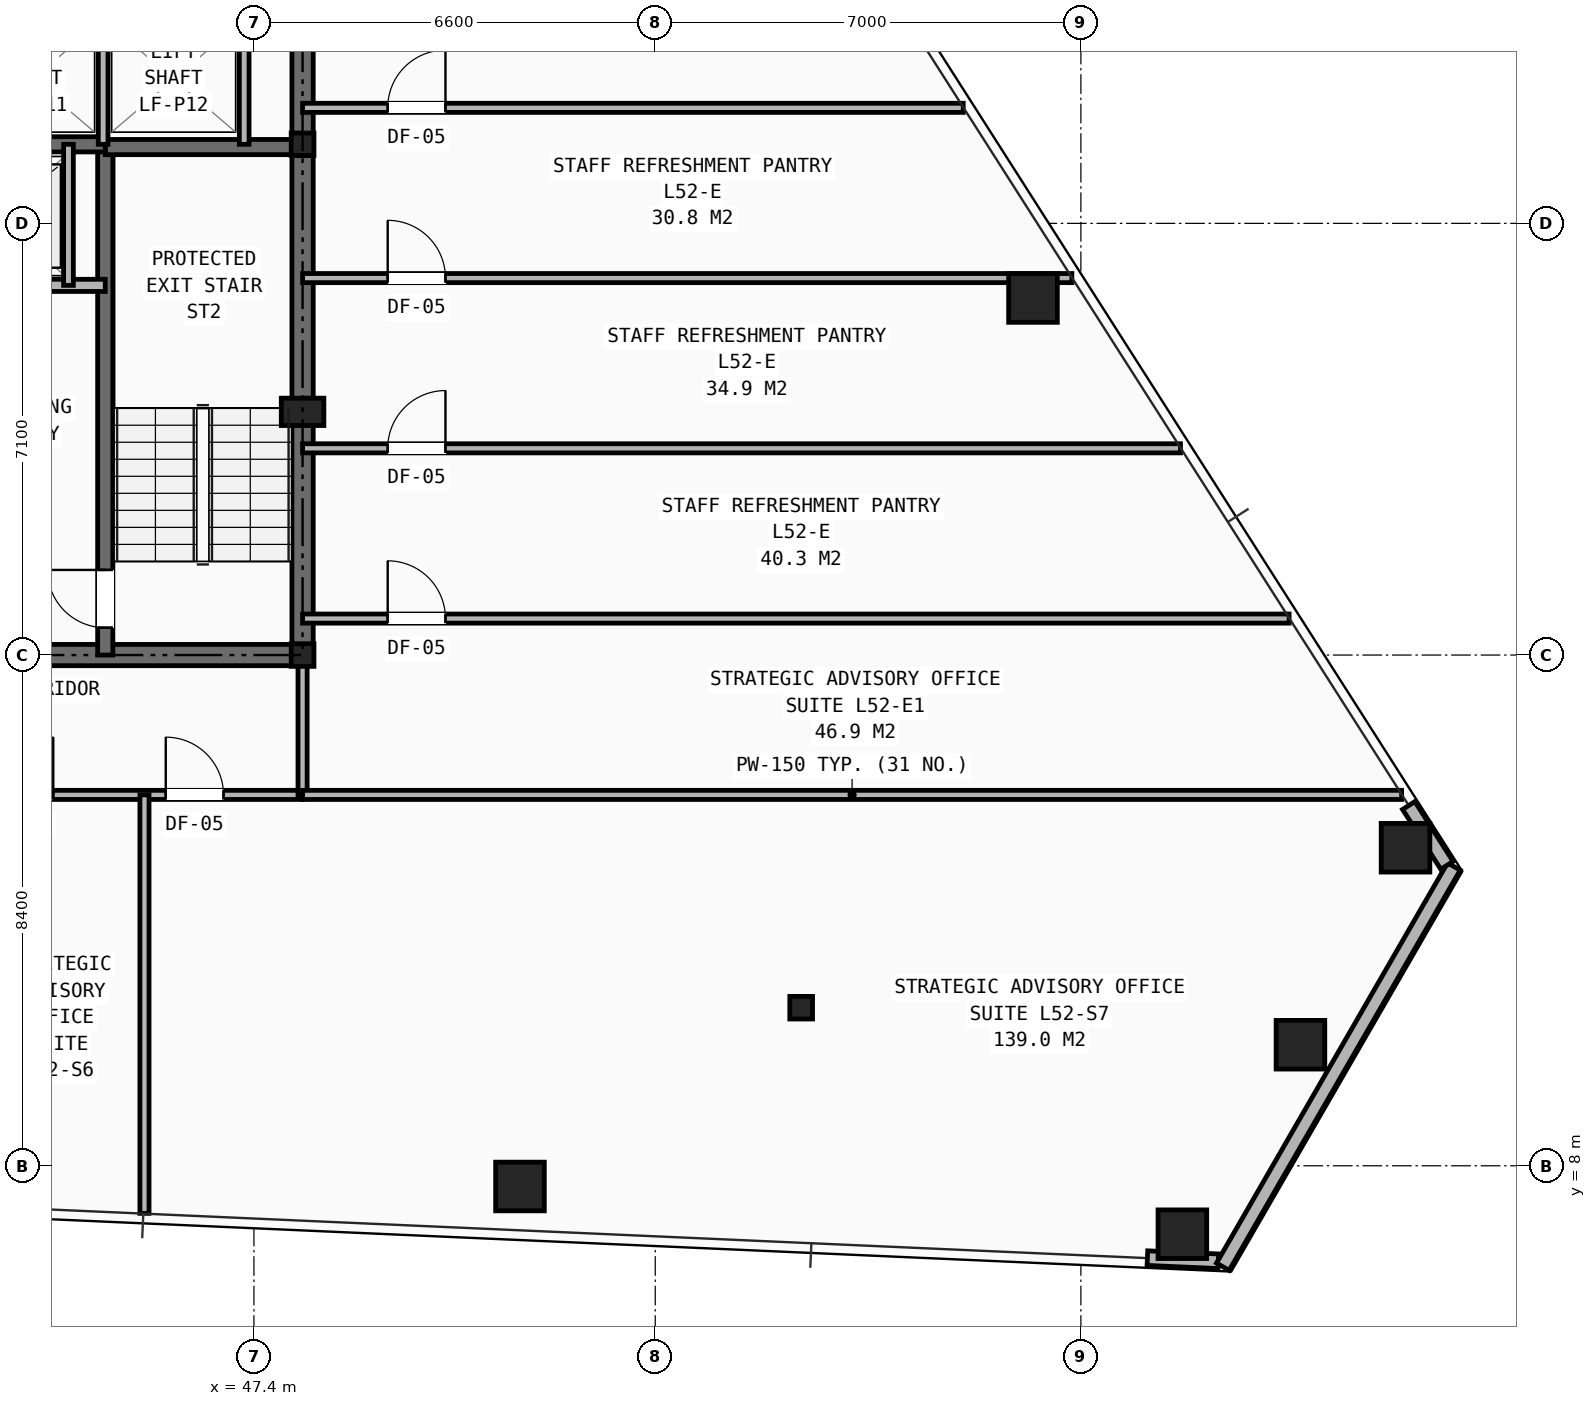
"""IFC4 building model, lengths in metres.
Left out: names, types, materials, properties, quantities, classifications, styles, units other than length and angle.
Written with IfcOpenShell. Run it as: python <this file> out.ifc"""

import sys

from ifc_helpers import new_model, si_unit, direction, frame, frame_2d, origin, origin_2d, place, context, subcontext, project, spatial, rectangle, hollow_rectangle, i_section, extrude, element, fill, save


model = new_model("IFC4")
c1 = context("Model", 3, precision=1e-05, world=origin(), true_north=direction((0.0, 1.0)))
c2 = subcontext(c1, "Body", "Model", "MODEL_VIEW")
j1 = project(units=[si_unit("LENGTHUNIT", "METRE"), si_unit("PLANEANGLEUNIT", "RADIAN")], contexts=[c1])
p1 = place(None, origin())
s1 = spatial("IfcSite", under=j1, at=p1, CompositionType="ELEMENT")
p2 = place(p1, origin())
s2 = spatial("IfcBuilding", under=s1, at=p2, CompositionType="ELEMENT")
p3 = place(p2, frame((0.0, 0.0, 182.7)))
s3 = spatial("IfcBuildingStorey", under=s2, at=p3, CompositionType="ELEMENT", Elevation=182.7)
for number, where, z_axis, x_axis in (
    (1, (48.2, 16.4, 0.0), (0.0, 0.0, 1.0), (1.0, 0.0, 0.0)),
    (2, (48.2, 24.8, 0.0), (0.0, 0.0, 1.0), (1.0, 0.0, 0.0)),
    (3, (56.4, 10.6, 0.0), (0.0, 0.0, 1.0), (1.0, 0.0, 0.0)),
):
    element("IfcColumn", number, at=place(p3, frame(where, z_axis=z_axis, x_axis=x_axis)), inside=s3, PredefinedType="COLUMN", context=c2, shape_type="SweptSolid", body=[
        extrude(i_section(OverallWidth=0.374, OverallDepth=0.372, WebThickness=0.016, FlangeThickness=0.026, at=origin_2d()), origin(), (0.0, 0.0, 1.0), 3.45),
    ])
p4 = place(p3, frame((48.2, 20.4, 0.0), z_axis=(0.0, 0.0, 1.0), x_axis=(1.0, 0.0, 0.0)))
e4 = element("IfcColumn", 4, at=p4, inside=s3, PredefinedType="PILASTER", context=c2, shape_type="SweptSolid", body=[
    extrude(rectangle(XDim=0.7, YDim=0.45, at=origin_2d()), origin(), (0.0, 0.0, 1.0), 3.45),
])
for number, where, z_axis, x_axis in (
    (5, (51.775, 7.659, 0.0), (0.0, 0.0, 1.0), (1.0, 0.0, 0.0)),
    (6, (62.669, 6.875, 0.0), (0.0, 0.0, 1.0), (1.0, 0.0, 0.0)),
    (7, (64.611, 9.991, 0.0), (0.0, 0.0, 1.0), (1.0, 0.0, 0.0)),
    (8, (66.339, 13.231, 0.0), (0.0, 0.0, 1.0), (1.0, 0.0, 0.0)),
    (9, (60.212, 22.272, 0.0), (0.0, 0.0, 1.0), (1.0, 0.0, 0.0)),
):
    element("IfcColumn", number, at=place(p3, frame(where, z_axis=z_axis, x_axis=x_axis)), inside=s3, PredefinedType="COLUMN", context=c2, shape_type="SweptSolid", body=[
        extrude(hollow_rectangle(XDim=0.8, YDim=0.8, WallThickness=0.055, at=origin_2d()), origin(), (0.0, 0.0, 1.0), 3.45),
    ])
p5 = place(p3, frame((62.094, 6.481, 0.0), z_axis=(0.0, 0.0, 1.0), x_axis=(0.999025931447, -0.04412695657, 0.0)))
e10 = element("IfcWall", 10, at=p5, inside=s3, PredefinedType="SHEAR", context=c2, shape_type="SweptSolid", body=[
    extrude(rectangle(XDim=1.167, YDim=0.24, at=frame_2d((0.584, 0.0))), origin(), (0.0, 0.0, 1.0), 2.583),
])
p6 = place(p3, frame((67.135, 12.922, 0.0), z_axis=(0.0, 0.0, 1.0), x_axis=(-0.500005158081, -0.866022425744, 0.0)))
e11 = element("IfcWall", 11, at=p6, inside=s3, PredefinedType="SHEAR", context=c2, shape_type="SweptSolid", body=[
    extrude(rectangle(XDim=7.6, YDim=0.24, at=frame_2d((3.8, 0.0))), origin(), (0.0, 0.0, 1.0), 2.583),
])
p7 = place(p3, frame((67.02, 12.941, 0.0), z_axis=(0.0, 0.0, 1.0), x_axis=(-0.537890013748, 0.843015025435, 0.0)))
e12 = element("IfcWall", 12, at=p7, inside=s3, PredefinedType="SHEAR", context=c2, shape_type="SweptSolid", body=[
    extrude(rectangle(XDim=1.167, YDim=0.24, at=frame_2d((0.584, 0.0))), origin(), (0.0, 0.0, 1.0), 2.583),
])
p8 = place(p3, frame((31.8, 16.4, 0.0), z_axis=(0.0, 0.0, 1.0), x_axis=(1.0, 0.0, 0.0)))
e13 = element("IfcWall", 13, at=p8, inside=s3, PredefinedType="SHEAR", context=c2, shape_type="SweptSolid", body=[
    extrude(rectangle(XDim=16.4, YDim=0.35, at=frame_2d((8.2, 0.0))), origin(), (0.0, 0.0, 1.0), 3.21),
])
p9 = place(p8, frame((7.75, 0.0, 0.0)))
e14 = element("IfcOpeningElement", 14, at=p9, cuts=e13, PredefinedType="OPENING", context=c2, shape_type="SweptSolid", body=[
    extrude(rectangle(XDim=0.9, YDim=2.1, at=frame_2d((0.45, 1.05))), frame((0.0, 0.185, 0.0), z_axis=(0.0, -1.0, 0.0), x_axis=(1.0, 0.0, 0.0)), (0.0, 0.0, 1.0), 0.37),
])
p10 = place(p8, frame((4.2, 0.0, 0.0)))
e15 = element("IfcOpeningElement", 15, at=p10, cuts=e13, PredefinedType="OPENING", context=c2, shape_type="SweptSolid", body=[
    extrude(rectangle(XDim=0.95, YDim=2.1, at=frame_2d((0.475, 1.05))), frame((0.0, 0.185, 0.0), z_axis=(0.0, -1.0, 0.0), x_axis=(1.0, 0.0, 0.0)), (0.0, 0.0, 1.0), 0.37),
])
p11 = place(p8, frame((10.6, 0.0, 0.0)))
e16 = element("IfcOpeningElement", 16, at=p11, cuts=e13, PredefinedType="OPENING", context=c2, shape_type="SweptSolid", body=[
    extrude(rectangle(XDim=0.95, YDim=2.1, at=frame_2d((0.475, 1.05))), frame((0.0, 0.185, 0.0), z_axis=(0.0, -1.0, 0.0), x_axis=(1.0, 0.0, 0.0)), (0.0, 0.0, 1.0), 0.37),
])
p12 = place(p3, frame((48.2, 16.4, 0.0), z_axis=(0.0, 0.0, 1.0), x_axis=(0.0, 1.0, 0.0)))
e17 = element("IfcWall", 17, at=p12, inside=s3, PredefinedType="SHEAR", context=c2, shape_type="SweptSolid", body=[
    extrude(rectangle(XDim=14.8, YDim=0.35, at=frame_2d((7.4, 0.0))), origin(), (0.0, 0.0, 1.0), 3.21),
])
p13 = place(p12, frame((11.0, 0.0, 0.0)))
e18 = element("IfcOpeningElement", 18, at=p13, cuts=e17, PredefinedType="OPENING", context=c2, shape_type="SweptSolid", body=[
    extrude(rectangle(XDim=1.1, YDim=2.15, at=frame_2d((0.55, 1.075))), frame((0.0, 0.185, 0.0), z_axis=(0.0, -1.0, 0.0), x_axis=(1.0, 0.0, 0.0)), (0.0, 0.0, 1.0), 0.37),
])
p14 = place(p3, frame((44.955, 16.4, 0.0), z_axis=(0.0, 0.0, 1.0), x_axis=(0.0, 1.0, 0.0)))
e19 = element("IfcWall", 19, at=p14, inside=s3, PredefinedType="SHEAR", context=c2, shape_type="SweptSolid", body=[
    extrude(rectangle(XDim=8.4, YDim=0.25, at=frame_2d((4.2, 0.0))), origin(), (0.0, 0.0, 1.0), 3.21),
])
p15 = place(p14, frame((0.45, 0.0, 0.0)))
e20 = element("IfcOpeningElement", 20, at=p15, cuts=e19, PredefinedType="OPENING", context=c2, shape_type="SweptSolid", body=[
    extrude(rectangle(XDim=0.95, YDim=2.1, at=frame_2d((0.475, 1.05))), frame((0.0, 0.135, 0.0), z_axis=(0.0, -1.0, 0.0), x_axis=(1.0, 0.0, 0.0)), (0.0, 0.0, 1.0), 0.27),
])
p16 = place(p3, frame((44.955, 24.755, 0.0), z_axis=(0.0, 0.0, 1.0), x_axis=(1.0, 0.0, 0.0)))
e21 = element("IfcWall", 21, at=p16, inside=s3, PredefinedType="SHEAR", context=c2, shape_type="SweptSolid", body=[
    extrude(rectangle(XDim=3.245, YDim=0.25, at=frame_2d((1.623, 0.0))), origin(), (0.0, 0.0, 1.0), 3.21),
])
p17 = place(p3, frame((35.045, 24.8, 0.0), z_axis=(0.0, 0.0, 1.0), x_axis=(1.0, 0.0, 0.0)))
e22 = element("IfcWall", 22, at=p17, inside=s3, PredefinedType="SHEAR", context=c2, shape_type="SweptSolid", body=[
    extrude(rectangle(XDim=9.91, YDim=0.25, at=frame_2d((4.955, 0.0))), origin(), (0.0, 0.0, 1.0), 3.21),
])
p18 = place(p3, frame((35.045, 22.48, 0.0), z_axis=(0.0, 0.0, 1.0), x_axis=(1.0, 0.0, 0.0)))
e23 = element("IfcWall", 23, at=p18, inside=s3, PredefinedType="SOLIDWALL", context=c2, shape_type="SweptSolid", body=[
    extrude(rectangle(XDim=9.91, YDim=0.2, at=frame_2d((4.955, 0.0))), origin(), (0.0, 0.0, 1.0), 3.21),
])
p19 = place(p18, frame((1.255, 0.0, 0.0)))
e24 = element("IfcOpeningElement", 24, at=p19, cuts=e23, PredefinedType="OPENING", context=c2, shape_type="SweptSolid", body=[
    extrude(rectangle(XDim=1.1, YDim=2.15, at=frame_2d((0.55, 1.075))), frame((0.0, 0.11, 0.0), z_axis=(0.0, -1.0, 0.0), x_axis=(1.0, 0.0, 0.0)), (0.0, 0.0, 1.0), 0.22),
])
p20 = place(p18, frame((7.555, 0.0, 0.0)))
e25 = element("IfcOpeningElement", 25, at=p20, cuts=e23, PredefinedType="OPENING", context=c2, shape_type="SweptSolid", body=[
    extrude(rectangle(XDim=1.1, YDim=2.15, at=frame_2d((0.55, 1.075))), frame((0.0, 0.11, 0.0), z_axis=(0.0, -1.0, 0.0), x_axis=(1.0, 0.0, 0.0)), (0.0, 0.0, 1.0), 0.22),
])
p21 = place(p18, frame((4.405, 0.0, 0.0)))
e26 = element("IfcOpeningElement", 26, at=p21, cuts=e23, PredefinedType="OPENING", context=c2, shape_type="SweptSolid", body=[
    extrude(rectangle(XDim=1.1, YDim=2.15, at=frame_2d((0.55, 1.075))), frame((0.0, 0.11, 0.0), z_axis=(0.0, -1.0, 0.0), x_axis=(1.0, 0.0, 0.0)), (0.0, 0.0, 1.0), 0.22),
])
p22 = place(p3, frame((44.35, 22.48, 0.0), z_axis=(0.0, 0.0, 1.0), x_axis=(0.0, 1.0, 0.0)))
e27 = element("IfcWall", 27, at=p22, inside=s3, PredefinedType="SOLIDWALL", context=c2, shape_type="SweptSolid", body=[
    extrude(rectangle(XDim=2.32, YDim=0.16, at=frame_2d((1.16, 0.0))), origin(), (0.0, 0.0, 1.0), 3.21),
])
for number, where, z_axis, x_axis in (
    (28, (44.92, 24.8, 0.0), (0.0, 0.0, 1.0), (0.0, 1.0, 0.0)),
    (29, (47.24, 24.8, 0.0), (0.0, 0.0, 1.0), (0.0, 1.0, 0.0)),
):
    element("IfcWall", number, at=place(p3, frame(where, z_axis=z_axis, x_axis=x_axis)), inside=s3, PredefinedType="SOLIDWALL", context=c2, shape_type="SweptSolid", body=[
        extrude(rectangle(XDim=2.08, YDim=0.16, at=frame_2d((1.04, 0.0))), origin(), (0.0, 0.0, 1.0), 3.21),
    ])
p23 = place(p3, frame((29.6, 14.1, 0.0), z_axis=(0.0, 0.0, 1.0), x_axis=(1.0, 0.0, 0.0)))
e30 = element("IfcWall", 30, at=p23, inside=s3, PredefinedType="PARTITIONING", context=c2, shape_type="SweptSolid", body=[
    extrude(rectangle(XDim=18.6, YDim=0.15, at=frame_2d((9.3, 0.0))), origin(), (0.0, 0.0, 1.0), 2.252),
])
p24 = place(p23, frame((0.55, 0.0, 0.0)))
e31 = element("IfcOpeningElement", 31, at=p24, cuts=e30, PredefinedType="OPENING", context=c2, shape_type="SweptSolid", body=[
    extrude(rectangle(XDim=0.95, YDim=2.1, at=frame_2d((0.475, 1.05))), frame((0.0, 0.085, 0.0), z_axis=(0.0, -1.0, 0.0), x_axis=(1.0, 0.0, 0.0)), (0.0, 0.0, 1.0), 0.17),
])
p25 = place(p23, frame((2.35, 0.0, 0.0)))
e32 = element("IfcOpeningElement", 32, at=p25, cuts=e30, PredefinedType="OPENING", context=c2, shape_type="SweptSolid", body=[
    extrude(rectangle(XDim=0.95, YDim=2.1, at=frame_2d((0.475, 1.05))), frame((0.0, 0.085, 0.0), z_axis=(0.0, -1.0, 0.0), x_axis=(1.0, 0.0, 0.0)), (0.0, 0.0, 1.0), 0.17),
])
p26 = place(p23, frame((5.15, 0.0, 0.0)))
e33 = element("IfcOpeningElement", 33, at=p26, cuts=e30, PredefinedType="OPENING", context=c2, shape_type="SweptSolid", body=[
    extrude(rectangle(XDim=0.95, YDim=2.1, at=frame_2d((0.475, 1.05))), frame((0.0, 0.085, 0.0), z_axis=(0.0, -1.0, 0.0), x_axis=(1.0, 0.0, 0.0)), (0.0, 0.0, 1.0), 0.17),
])
p27 = place(p23, frame((7.95, 0.0, 0.0)))
e34 = element("IfcOpeningElement", 34, at=p27, cuts=e30, PredefinedType="OPENING", context=c2, shape_type="SweptSolid", body=[
    extrude(rectangle(XDim=0.95, YDim=2.1, at=frame_2d((0.475, 1.05))), frame((0.0, 0.085, 0.0), z_axis=(0.0, -1.0, 0.0), x_axis=(1.0, 0.0, 0.0)), (0.0, 0.0, 1.0), 0.17),
])
p28 = place(p23, frame((10.75, 0.0, 0.0)))
e35 = element("IfcOpeningElement", 35, at=p28, cuts=e30, PredefinedType="OPENING", context=c2, shape_type="SweptSolid", body=[
    extrude(rectangle(XDim=0.95, YDim=2.1, at=frame_2d((0.475, 1.05))), frame((0.0, 0.085, 0.0), z_axis=(0.0, -1.0, 0.0), x_axis=(1.0, 0.0, 0.0)), (0.0, 0.0, 1.0), 0.17),
])
p29 = place(p23, frame((13.55, 0.0, 0.0)))
e36 = element("IfcOpeningElement", 36, at=p29, cuts=e30, PredefinedType="OPENING", context=c2, shape_type="SweptSolid", body=[
    extrude(rectangle(XDim=0.95, YDim=2.1, at=frame_2d((0.475, 1.05))), frame((0.0, 0.085, 0.0), z_axis=(0.0, -1.0, 0.0), x_axis=(1.0, 0.0, 0.0)), (0.0, 0.0, 1.0), 0.17),
])
p30 = place(p23, frame((16.35, 0.0, 0.0)))
e37 = element("IfcOpeningElement", 37, at=p30, cuts=e30, PredefinedType="OPENING", context=c2, shape_type="SweptSolid", body=[
    extrude(rectangle(XDim=0.95, YDim=2.1, at=frame_2d((0.475, 1.05))), frame((0.0, 0.085, 0.0), z_axis=(0.0, -1.0, 0.0), x_axis=(1.0, 0.0, 0.0)), (0.0, 0.0, 1.0), 0.17),
])
p31 = place(p3, frame((48.2, 14.1, 0.0), z_axis=(0.0, 0.0, 1.0), x_axis=(0.0, 1.0, 0.0)))
e38 = element("IfcWall", 38, at=p31, inside=s3, PredefinedType="PARTITIONING", context=c2, shape_type="SweptSolid", body=[
    extrude(rectangle(XDim=2.3, YDim=0.15, at=frame_2d((1.15, 0.0))), origin(), (0.0, 0.0, 1.0), 2.665),
])
p32 = place(p3, frame((45.6, 7.217, 0.0), z_axis=(0.0, 0.0, 1.0), x_axis=(0.0, 1.0, 0.0)))
e39 = element("IfcWall", 39, at=p32, inside=s3, PredefinedType="PARTITIONING", context=c2, shape_type="SweptSolid", body=[
    extrude(rectangle(XDim=6.883, YDim=0.15, at=frame_2d((3.441, 0.0))), origin(), (0.0, 0.0, 1.0), 2.589),
])
p33 = place(p3, frame((48.2, 14.1, 0.0), z_axis=(0.0, 0.0, 1.0), x_axis=(1.0, 0.0, 0.0)))
e40 = element("IfcWall", 40, at=p33, inside=s3, PredefinedType="PARTITIONING", context=c2, shape_type="SweptSolid", body=[
    extrude(rectangle(XDim=18.074, YDim=0.15, at=frame_2d((9.037, 0.0))), origin(), (0.0, 0.0, 1.0), 2.589),
])
p34 = place(p3, frame((48.2, 17.0, 0.0), z_axis=(0.0, 0.0, 1.0), x_axis=(1.0, 0.0, 0.0)))
e41 = element("IfcWall", 41, at=p34, inside=s3, PredefinedType="PARTITIONING", context=c2, shape_type="SweptSolid", body=[
    extrude(rectangle(XDim=16.224, YDim=0.15, at=frame_2d((8.112, 0.0))), origin(), (0.0, 0.0, 1.0), 2.589),
])
p35 = place(p34, frame((1.4, 0.0, 0.0)))
e42 = element("IfcOpeningElement", 42, at=p35, cuts=e41, PredefinedType="OPENING", context=c2, shape_type="SweptSolid", body=[
    extrude(rectangle(XDim=0.95, YDim=2.1, at=frame_2d((0.475, 1.05))), frame((0.0, 0.085, 0.0), z_axis=(0.0, -1.0, 0.0), x_axis=(1.0, 0.0, 0.0)), (0.0, 0.0, 1.0), 0.17),
])
p36 = place(p3, frame((48.2, 19.8, 0.0), z_axis=(0.0, 0.0, 1.0), x_axis=(1.0, 0.0, 0.0)))
e43 = element("IfcWall", 43, at=p36, inside=s3, PredefinedType="PARTITIONING", context=c2, shape_type="SweptSolid", body=[
    extrude(rectangle(XDim=14.438, YDim=0.15, at=frame_2d((7.219, 0.0))), origin(), (0.0, 0.0, 1.0), 2.589),
])
p37 = place(p36, frame((1.4, 0.0, 0.0)))
e44 = element("IfcOpeningElement", 44, at=p37, cuts=e43, PredefinedType="OPENING", context=c2, shape_type="SweptSolid", body=[
    extrude(rectangle(XDim=0.95, YDim=2.1, at=frame_2d((0.475, 1.05))), frame((0.0, 0.085, 0.0), z_axis=(0.0, -1.0, 0.0), x_axis=(1.0, 0.0, 0.0)), (0.0, 0.0, 1.0), 0.17),
])
p38 = place(p3, frame((48.2, 22.6, 0.0), z_axis=(0.0, 0.0, 1.0), x_axis=(1.0, 0.0, 0.0)))
e45 = element("IfcWall", 45, at=p38, inside=s3, PredefinedType="PARTITIONING", context=c2, shape_type="SweptSolid", body=[
    extrude(rectangle(XDim=12.652, YDim=0.15, at=frame_2d((6.326, 0.0))), origin(), (0.0, 0.0, 1.0), 2.589),
])
p39 = place(p38, frame((1.4, 0.0, 0.0)))
e46 = element("IfcOpeningElement", 46, at=p39, cuts=e45, PredefinedType="OPENING", context=c2, shape_type="SweptSolid", body=[
    extrude(rectangle(XDim=0.95, YDim=2.1, at=frame_2d((0.475, 1.05))), frame((0.0, 0.085, 0.0), z_axis=(0.0, -1.0, 0.0), x_axis=(1.0, 0.0, 0.0)), (0.0, 0.0, 1.0), 0.17),
])
p40 = place(p3, frame((48.2, 25.4, 0.0), z_axis=(0.0, 0.0, 1.0), x_axis=(1.0, 0.0, 0.0)))
e47 = element("IfcWall", 47, at=p40, inside=s3, PredefinedType="PARTITIONING", context=c2, shape_type="SweptSolid", body=[
    extrude(rectangle(XDim=10.865, YDim=0.15, at=frame_2d((5.433, 0.0))), origin(), (0.0, 0.0, 1.0), 2.589),
])
p41 = place(p40, frame((1.4, 0.0, 0.0)))
e48 = element("IfcOpeningElement", 48, at=p41, cuts=e47, PredefinedType="OPENING", context=c2, shape_type="SweptSolid", body=[
    extrude(rectangle(XDim=0.95, YDim=2.1, at=frame_2d((0.475, 1.05))), frame((0.0, 0.085, 0.0), z_axis=(0.0, -1.0, 0.0), x_axis=(1.0, 0.0, 0.0)), (0.0, 0.0, 1.0), 0.17),
])
p42 = place(p15, origin())
e49 = element("IfcDoor", 49, at=p42, inside=s3, OperationType="SINGLE_SWING_RIGHT", PredefinedType="DOOR", context=c2, shape_type="SweptSolid", body=[
    extrude(rectangle(XDim=0.95, YDim=2.1, at=frame_2d((0.475, 1.05))), frame((0.0, 0.025, 0.0), z_axis=(0.0, -1.0, 0.0), x_axis=(1.0, 0.0, 0.0)), (0.0, 0.0, 1.0), 0.05),
])
fill(e20, e49)
p43 = place(p29, origin())
e50 = element("IfcDoor", 50, at=p43, inside=s3, OperationType="SINGLE_SWING_RIGHT", PredefinedType="DOOR", context=c2, shape_type="SweptSolid", body=[
    extrude(rectangle(XDim=0.95, YDim=2.1, at=frame_2d((0.475, 1.05))), frame((0.0, 0.025, 0.0), z_axis=(0.0, -1.0, 0.0), x_axis=(1.0, 0.0, 0.0)), (0.0, 0.0, 1.0), 0.05),
])
fill(e36, e50)
p44 = place(p30, origin())
e51 = element("IfcDoor", 51, at=p44, inside=s3, OperationType="SINGLE_SWING_LEFT", PredefinedType="DOOR", context=c2, shape_type="SweptSolid", body=[
    extrude(rectangle(XDim=0.95, YDim=2.1, at=frame_2d((0.475, 1.05))), frame((0.0, 0.025, 0.0), z_axis=(0.0, -1.0, 0.0), x_axis=(1.0, 0.0, 0.0)), (0.0, 0.0, 1.0), 0.05),
])
fill(e37, e51)
p45 = place(p35, origin())
e52 = element("IfcDoor", 52, at=p45, inside=s3, OperationType="SINGLE_SWING_LEFT", PredefinedType="DOOR", context=c2, shape_type="SweptSolid", body=[
    extrude(rectangle(XDim=0.95, YDim=2.1, at=frame_2d((0.475, 1.05))), frame((0.0, 0.025, 0.0), z_axis=(0.0, -1.0, 0.0), x_axis=(1.0, 0.0, 0.0)), (0.0, 0.0, 1.0), 0.05),
])
fill(e42, e52)
p46 = place(p37, origin())
e53 = element("IfcDoor", 53, at=p46, inside=s3, OperationType="SINGLE_SWING_RIGHT", PredefinedType="DOOR", context=c2, shape_type="SweptSolid", body=[
    extrude(rectangle(XDim=0.95, YDim=2.1, at=frame_2d((0.475, 1.05))), frame((0.0, 0.025, 0.0), z_axis=(0.0, -1.0, 0.0), x_axis=(1.0, 0.0, 0.0)), (0.0, 0.0, 1.0), 0.05),
])
fill(e44, e53)
p47 = place(p39, origin())
e54 = element("IfcDoor", 54, at=p47, inside=s3, OperationType="SINGLE_SWING_LEFT", PredefinedType="DOOR", context=c2, shape_type="SweptSolid", body=[
    extrude(rectangle(XDim=0.95, YDim=2.1, at=frame_2d((0.475, 1.05))), frame((0.0, 0.025, 0.0), z_axis=(0.0, -1.0, 0.0), x_axis=(1.0, 0.0, 0.0)), (0.0, 0.0, 1.0), 0.05),
])
fill(e46, e54)
p48 = place(p41, origin())
e55 = element("IfcDoor", 55, at=p48, inside=s3, OperationType="SINGLE_SWING_RIGHT", PredefinedType="DOOR", context=c2, shape_type="SweptSolid", body=[
    extrude(rectangle(XDim=0.95, YDim=2.1, at=frame_2d((0.475, 1.05))), frame((0.0, 0.025, 0.0), z_axis=(0.0, -1.0, 0.0), x_axis=(1.0, 0.0, 0.0)), (0.0, 0.0, 1.0), 0.05),
])
fill(e48, e55)
save(model, sys.argv[1])
